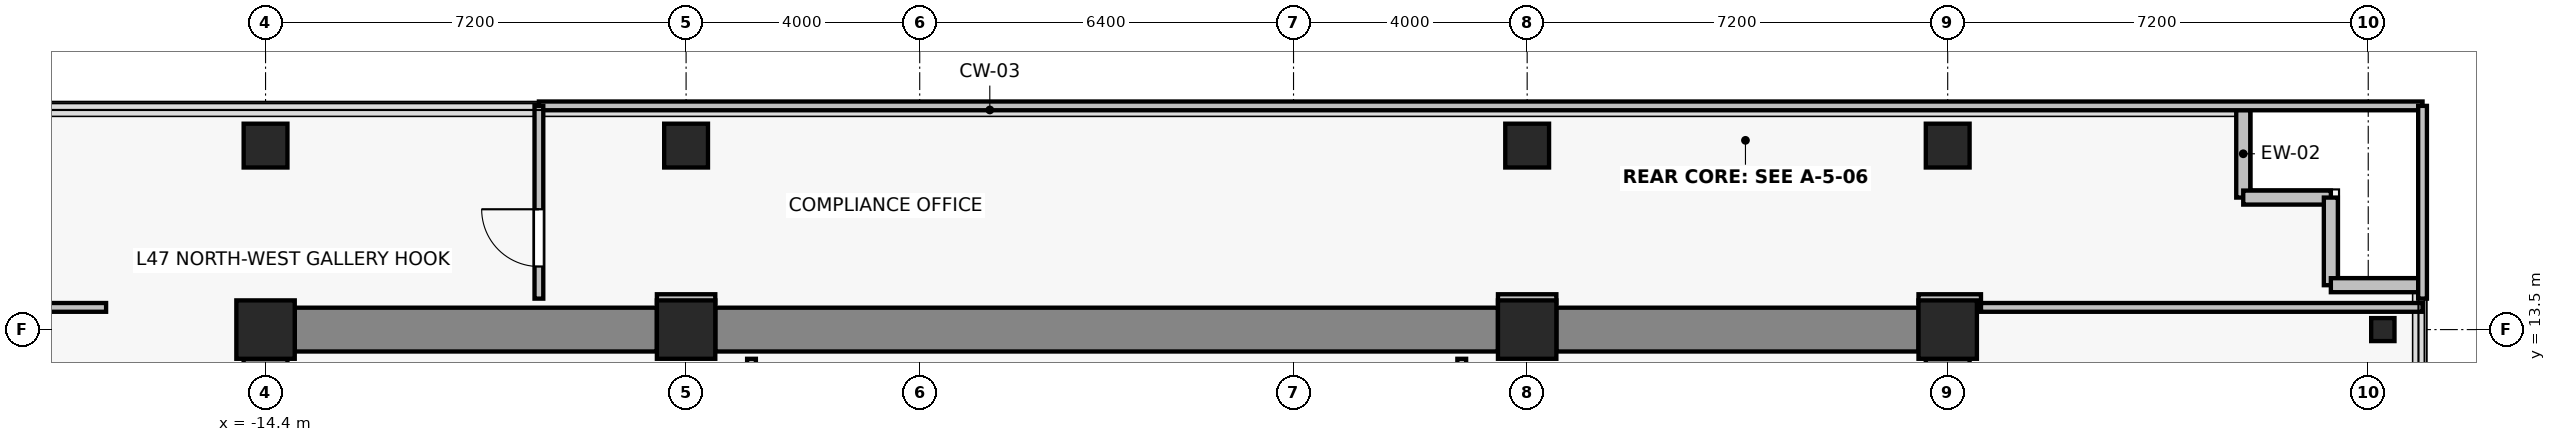
"""IFC4 building model, lengths in metres.
Left out: names, types, materials, properties, quantities, classifications, styles, units other than length and angle.
Written with IfcOpenShell. Run it as: python <this file> out.ifc"""

import sys

from ifc_helpers import new_model, si_unit, direction, frame, frame_2d, origin, origin_2d, place, context, subcontext, project, spatial, rectangle, i_section, extrude, source, transform, mapped, element, fill, save


model = new_model("IFC4")
c1 = context("Model", 3, precision=1e-05, world=origin(), true_north=direction((0.0, 1.0)))
c2 = subcontext(c1, "Body", "Model", "MODEL_VIEW")
j1 = project(units=[si_unit("LENGTHUNIT", "METRE"), si_unit("PLANEANGLEUNIT", "RADIAN")], contexts=[c1])
p1 = place(None, origin())
s1 = spatial("IfcSite", under=j1, at=p1, CompositionType="ELEMENT")
p2 = place(p1, origin())
s2 = spatial("IfcBuilding", under=s1, at=p2, CompositionType="ELEMENT")
p3 = place(p2, frame((0.0, 0.0, 169.3)))
s3 = spatial("IfcBuildingStorey", under=s2, at=p3, CompositionType="ELEMENT", Elevation=169.3)
for number, where, z_axis, x_axis in (
    (1, (-14.4, 13.5, 0.0), (0.0, 0.0, 1.0), (1.0, 0.0, 0.0)),
    (2, (-7.2, 13.5, 0.0), (0.0, 0.0, 1.0), (1.0, 0.0, 0.0)),
    (3, (7.2, 13.5, 0.0), (0.0, 0.0, 1.0), (1.0, 0.0, 0.0)),
    (4, (14.4, 13.5, 0.0), (0.0, 0.0, 1.0), (1.0, 0.0, 0.0)),
):
    element("IfcColumn", number, at=place(p3, frame(where, z_axis=z_axis, x_axis=x_axis)), inside=s3, PredefinedType="COLUMN", context=c2, shape_type="SweptSolid", body=[
        extrude(rectangle(XDim=1.0, YDim=1.0, at=origin_2d()), origin(), (0.0, 0.0, 1.0), 3.3),
    ])
for number, where, z_axis, x_axis in (
    (5, (-14.4, 16.65, 0.0), (0.0, 0.0, 1.0), (1.0, 0.0, 0.0)),
    (6, (-7.2, 16.65, 0.0), (0.0, 0.0, 1.0), (1.0, 0.0, 0.0)),
    (7, (7.2, 16.65, 0.0), (0.0, 0.0, 1.0), (1.0, 0.0, 0.0)),
    (8, (14.4, 16.65, 0.0), (0.0, 0.0, 1.0), (1.0, 0.0, 0.0)),
):
    element("IfcColumn", number, at=place(p3, frame(where, z_axis=z_axis, x_axis=x_axis)), inside=s3, PredefinedType="COLUMN", context=c2, shape_type="SweptSolid", body=[
        extrude(rectangle(XDim=0.75, YDim=0.75, at=origin_2d()), origin(), (0.0, 0.0, 1.0), 3.3),
    ])
p4 = place(p3, frame((21.85, 13.5, 0.0), z_axis=(0.0, 0.0, 1.0), x_axis=(1.0, 0.0, 0.0)))
e9 = element("IfcColumn", 9, at=p4, inside=s3, PredefinedType="COLUMN", context=c2, shape_type="SweptSolid", body=[
    extrude(i_section(OverallWidth=0.399, OverallDepth=0.394, WebThickness=0.023, FlangeThickness=0.037, FilletRadius=0.015, at=origin_2d()), origin(), (0.0, 0.0, 1.0), 3.3),
])
p5 = place(p3, frame((-13.9, 13.5, 0.0), z_axis=(0.0, 0.0, 1.0), x_axis=(1.0, 0.0, 0.0)))
e10 = element("IfcWall", 10, at=p5, inside=s3, PredefinedType="SHEAR", context=c2, shape_type="SweptSolid", body=[
    extrude(rectangle(XDim=6.2, YDim=0.75, at=frame_2d((3.1, 0.0))), origin(), (0.0, 0.0, 1.0), 3.075),
])
p6 = place(p3, frame((-6.7, 13.5, 0.0), z_axis=(0.0, 0.0, 1.0), x_axis=(1.0, 0.0, 0.0)))
e11 = element("IfcWall", 11, at=p6, inside=s3, PredefinedType="SHEAR", context=c2, shape_type="SweptSolid", body=[
    extrude(rectangle(XDim=13.4, YDim=0.75, at=frame_2d((6.7, 0.0))), origin(), (0.0, 0.0, 1.0), 3.075),
])
p7 = place(p3, frame((7.7, 13.5, 0.0), z_axis=(0.0, 0.0, 1.0), x_axis=(1.0, 0.0, 0.0)))
e12 = element("IfcWall", 12, at=p7, inside=s3, PredefinedType="SHEAR", context=c2, shape_type="SweptSolid", body=[
    extrude(rectangle(XDim=6.2, YDim=0.75, at=frame_2d((3.1, 0.0))), origin(), (0.0, 0.0, 1.0), 3.075),
])
for number, where, z_axis, x_axis in (
    (13, (-14.4, 7.1, 0.0), (0.0, 0.0, 1.0), (0.0, 1.0, 0.0)),
    (14, (14.4, 7.1, 0.0), (0.0, 0.0, 1.0), (0.0, 1.0, 0.0)),
):
    element("IfcWall", number, at=place(p3, frame(where, z_axis=z_axis, x_axis=x_axis)), inside=s3, PredefinedType="SHEAR", context=c2, shape_type="SweptSolid", body=[
        extrude(rectangle(XDim=5.9, YDim=0.75, at=frame_2d((2.95, 0.0))), origin(), (0.0, 0.0, 1.0), 3.075),
    ])
for number, where, z_axis, x_axis in (
    (15, (19.46, 15.76, 0.0), (0.0, 0.0, 1.0), (0.0, 1.0, 0.0)),
    (16, (20.96, 15.76, 0.0), (0.0, 0.0, 1.0), (-1.0, 0.0, 0.0)),
    (17, (20.96, 14.26, 0.0), (0.0, 0.0, 1.0), (0.0, 1.0, 0.0)),
    (18, (22.46, 14.26, 0.0), (0.0, 0.0, 1.0), (-1.0, 0.0, 0.0)),
):
    element("IfcWall", number, at=place(p3, frame(where, z_axis=z_axis, x_axis=x_axis)), inside=s3, PredefinedType="SOLIDWALL", context=c2, shape_type="SweptSolid", body=[
        extrude(rectangle(XDim=1.5, YDim=0.24, at=frame_2d((0.75, 0.0))), origin(), (0.0, 0.0, 1.0), 3.075),
    ])
for number, where, z_axis, x_axis in (
    (19, (-6.08, 10.2, 0.0), (0.0, 0.0, 1.0), (0.0, 1.0, 0.0)),
    (20, (6.08, 13.0, 0.0), (0.0, 0.0, 1.0), (0.0, -1.0, 0.0)),
):
    element("IfcWall", number, at=place(p3, frame(where, z_axis=z_axis, x_axis=x_axis)), inside=s3, PredefinedType="PARTITIONING", context=c2, shape_type="SweptSolid", body=[
        extrude(rectangle(XDim=2.8, YDim=0.15, at=frame_2d((1.4, 0.0))), origin(), (0.0, 0.0, 1.0), 3.075),
    ])
p8 = place(p3, frame((-26.53, 13.88, 0.0), z_axis=(0.0, 0.0, 1.0), x_axis=(1.0, 0.0, 0.0)))
e21 = element("IfcWall", 21, at=p8, inside=s3, PredefinedType="PARTITIONING", context=c2, shape_type="SweptSolid", body=[
    extrude(rectangle(XDim=9.4, YDim=0.15, at=frame_2d((4.7, 0.0))), origin(), (0.0, 0.0, 1.0), 3.075),
])
p9 = place(p8, frame((4.26, 0.0, 0.0)))
e22 = element("IfcOpeningElement", 22, at=p9, cuts=e21, PredefinedType="OPENING", context=c2, shape_type="SweptSolid", body=[
    extrude(rectangle(XDim=0.88, YDim=2.1, at=frame_2d((0.44, 1.05))), frame((0.0, 0.085, 0.0), z_axis=(0.0, -1.0, 0.0), x_axis=(1.0, 0.0, 0.0)), (0.0, 0.0, 1.0), 0.17),
])
p10 = place(p3, frame((14.97, 13.88, 0.0), z_axis=(0.0, 0.0, 1.0), x_axis=(1.0, 0.0, 0.0)))
e23 = element("IfcWall", 23, at=p10, inside=s3, PredefinedType="PARTITIONING", context=c2, shape_type="SweptSolid", body=[
    extrude(rectangle(XDim=7.56, YDim=0.15, at=frame_2d((3.78, 0.0))), origin(), (0.0, 0.0, 1.0), 3.075),
])
for number, where, z_axis, x_axis in (
    (24, (-6.7, 14.03, 0.0), (0.0, 0.0, 1.0), (-1.0, 0.0, 0.0)),
    (25, (7.7, 14.03, 0.0), (0.0, 0.0, 1.0), (-1.0, 0.0, 0.0)),
):
    element("IfcWall", number, at=place(p3, frame(where, z_axis=z_axis, x_axis=x_axis)), inside=s3, PredefinedType="PARTITIONING", context=c2, shape_type="SweptSolid", body=[
        extrude(rectangle(XDim=1.0, YDim=0.15, at=frame_2d((0.5, 0.0))), origin(), (0.0, 0.0, 1.0), 2.565),
    ])
p11 = place(p3, frame((14.97, 14.03, 0.0), z_axis=(0.0, 0.0, 1.0), x_axis=(-1.0, 0.0, 0.0)))
e26 = element("IfcWall", 26, at=p11, inside=s3, PredefinedType="PARTITIONING", context=c2, shape_type="SweptSolid", body=[
    extrude(rectangle(XDim=1.07, YDim=0.15, at=frame_2d((0.535, 0.0))), origin(), (0.0, 0.0, 1.0), 2.565),
])
p12 = place(p3, frame((-9.72, 17.33, 0.0), z_axis=(0.0, 0.0, 1.0), x_axis=(1.0, 0.0, 0.0)))
e27 = element("IfcWall", 27, at=p12, inside=s3, PredefinedType="PARTITIONING", context=c2, shape_type="SweptSolid", body=[
    extrude(rectangle(XDim=32.25, YDim=0.15, at=frame_2d((16.125, 0.0))), origin(), (0.0, 0.0, 1.0), 3.075),
])
p13 = place(p3, frame((-9.72, 14.03, 0.0), z_axis=(0.0, 0.0, 1.0), x_axis=(0.0, 1.0, 0.0)))
e28 = element("IfcWall", 28, at=p13, inside=s3, PredefinedType="PARTITIONING", context=c2, shape_type="SweptSolid", body=[
    extrude(rectangle(XDim=3.3, YDim=0.15, at=frame_2d((1.65, 0.0))), origin(), (0.0, 0.0, 1.0), 2.565),
])
p14 = place(p13, frame((0.55, 0.0, 0.0)))
e29 = element("IfcOpeningElement", 29, at=p14, cuts=e28, PredefinedType="OPENING", context=c2, shape_type="SweptSolid", body=[
    extrude(rectangle(XDim=0.98, YDim=2.15, at=frame_2d((0.49, 1.075))), frame((0.0, 0.085, 0.0), z_axis=(0.0, -1.0, 0.0), x_axis=(1.0, 0.0, 0.0)), (0.0, 0.0, 1.0), 0.17),
])
p15 = place(p3, frame((22.53, 17.33, 0.0), z_axis=(0.0, 0.0, 1.0), x_axis=(0.0, -1.0, 0.0)))
e30 = element("IfcWall", 30, at=p15, inside=s3, PredefinedType="PARTITIONING", context=c2, shape_type="SweptSolid", body=[
    extrude(rectangle(XDim=3.3, YDim=0.15, at=frame_2d((1.65, 0.0))), origin(), (0.0, 0.0, 1.0), 3.075),
])
m1 = source(origin(), c2, "Body", "SweptSolid", [
    extrude(rectangle(XDim=0.98, YDim=2.15, at=frame_2d((0.49, 1.075))), frame((0.0, 0.025, 0.0), z_axis=(0.0, -1.0, 0.0), x_axis=(1.0, 0.0, 0.0)), (0.0, 0.0, 1.0), 0.05),
])
p16 = place(p14, origin())
e31 = element("IfcDoor", 31, at=p16, inside=s3, OperationType="SINGLE_SWING_RIGHT", PredefinedType="DOOR", context=c2, shape_type="MappedRepresentation", body=[
    mapped(m1, transform((0.0, 0.0, 0.0), x_axis=(1.0, 0.0, 0.0), y_axis=(0.0, 1.0, 0.0), z_axis=(0.0, 0.0, 1.0), scale=1.0)),
])
fill(e29, e31)
save(model, sys.argv[1])
